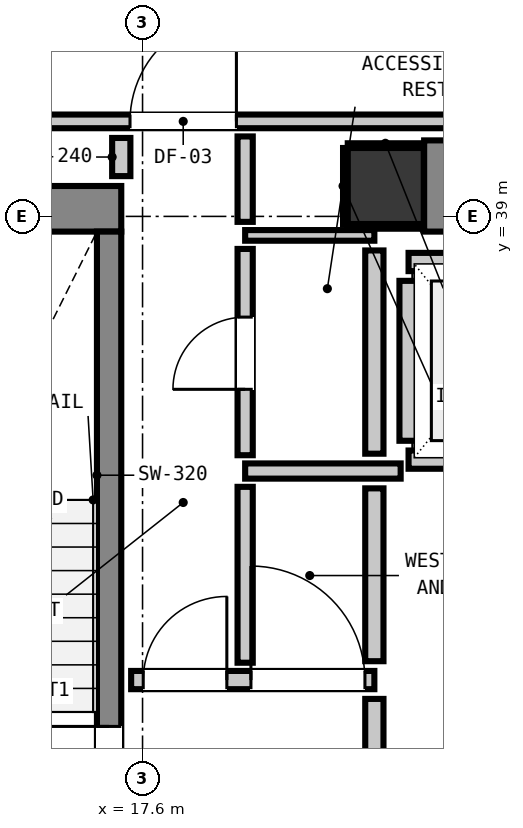
"""IFC4 building model, lengths in metres.
Left out: names, types, materials, properties, quantities, classifications, styles, units other than length and angle.
Written with IfcOpenShell. Run it as: python <this file> out.ifc"""

import sys

from ifc_helpers import new_model, si_unit, direction, frame, frame_2d, origin, origin_2d, place, context, subcontext, project, spatial, rectangle, extrude, element, fill, save


model = new_model("IFC4")
c1 = context("Model", 3, precision=1e-05, world=origin(), true_north=direction((0.0, 1.0)))
c2 = subcontext(c1, "Body", "Model", "MODEL_VIEW")
j1 = project(units=[si_unit("LENGTHUNIT", "METRE"), si_unit("PLANEANGLEUNIT", "RADIAN")], contexts=[c1])
p1 = place(None, origin())
s1 = spatial("IfcSite", under=j1, at=p1, CompositionType="ELEMENT")
p2 = place(p1, origin())
s2 = spatial("IfcBuilding", under=s1, at=p2, CompositionType="ELEMENT")
p3 = place(p2, frame((0.0, 0.0, 35.28)))
s3 = spatial("IfcBuildingStorey", under=s2, at=p3, CompositionType="ELEMENT", Elevation=35.28)
p4 = place(p3, frame((20.8, 39.4, 0.0), z_axis=(0.0, 0.0, 1.0), x_axis=(1.0, 0.0, 0.0)))
e1 = element("IfcColumn", 1, at=p4, inside=s3, PredefinedType="COLUMN", context=c2, shape_type="SweptSolid", body=[
    extrude(rectangle(XDim=1.0, YDim=1.0, at=origin_2d()), origin(), (0.0, 0.0, 1.0), 3.32),
])
p5 = place(p3, frame((13.24, 39.1, 0.0), z_axis=(0.0, 0.0, 1.0), x_axis=(1.0, 0.0, 0.0)))
e2 = element("IfcWall", 2, at=p5, inside=s3, PredefinedType="SHEAR", context=c2, shape_type="SweptSolid", body=[
    extrude(rectangle(XDim=4.08, YDim=0.6, at=frame_2d((2.04, 0.0))), origin(), (0.0, 0.0, 1.0), 3.32),
])
p6 = place(p3, frame((21.305, 39.4, 0.0), z_axis=(0.0, 0.0, 1.0), x_axis=(1.0, 0.0, 0.0)))
e3 = element("IfcWall", 3, at=p6, inside=s3, PredefinedType="SHEAR", context=c2, shape_type="SweptSolid", body=[
    extrude(rectangle(XDim=7.39, YDim=1.2, at=frame_2d((3.695, 0.0))), origin(), (0.0, 0.0, 1.0), 3.32),
])
p7 = place(p3, frame((17.16, 31.0, 0.0), z_axis=(0.0, 0.0, 1.0), x_axis=(0.0, 1.0, 0.0)))
e4 = element("IfcWall", 4, at=p7, inside=s3, PredefinedType="SHEAR", context=c2, shape_type="SweptSolid", body=[
    extrude(rectangle(XDim=7.8, YDim=0.32, at=frame_2d((3.9, 0.0))), origin(), (0.0, 0.0, 1.0), 3.32),
])
p8 = place(p7, frame((0.19, 0.0, 0.0)))
e5 = element("IfcOpeningElement", 5, at=p8, cuts=e4, PredefinedType="OPENING", context=c2, shape_type="SweptSolid", body=[
    extrude(rectangle(XDim=1.1, YDim=2.15, at=frame_2d((0.55, 1.075))), frame((0.0, 0.17, 0.0), z_axis=(0.0, -1.0, 0.0), x_axis=(1.0, 0.0, 0.0)), (0.0, 0.0, 1.0), 0.34),
])
for number, where, z_axis, x_axis in (
    (6, (21.1, 35.8, 0.0), (0.0, 0.0, 1.0), (1.0, 0.0, 0.0)),
    (7, (21.1, 38.4, 0.0), (0.0, 0.0, 1.0), (1.0, 0.0, 0.0)),
):
    element("IfcWall", number, at=place(p3, frame(where, z_axis=z_axis, x_axis=x_axis)), inside=s3, PredefinedType="PARTITIONING", context=c2, shape_type="SweptSolid", body=[
        extrude(rectangle(XDim=2.2, YDim=0.24, at=frame_2d((1.1, 0.0))), origin(), (0.0, 0.0, 1.0), 3.06),
    ])
p9 = place(p3, frame((21.1, 36.048, 0.0), z_axis=(0.0, 0.0, 1.0), x_axis=(0.0, 1.0, 0.0)))
e8 = element("IfcWall", 8, at=p9, inside=s3, PredefinedType="PARTITIONING", context=c2, shape_type="SweptSolid", body=[
    extrude(rectangle(XDim=2.104, YDim=0.24, at=frame_2d((1.052, 0.0))), origin(), (0.0, 0.0, 1.0), 2.295),
])
p10 = place(p3, frame((17.45, 32.9, 0.0), z_axis=(0.0, 0.0, 1.0), x_axis=(1.0, 0.0, 0.0)))
e9 = element("IfcWall", 9, at=p10, inside=s3, PredefinedType="PARTITIONING", context=c2, shape_type="SweptSolid", body=[
    extrude(rectangle(XDim=3.2, YDim=0.24, at=frame_2d((1.6, 0.0))), origin(), (0.0, 0.0, 1.0), 3.06),
])
p11 = place(p10, frame((0.159, 0.0, 0.0)))
e10 = element("IfcOpeningElement", 10, at=p11, cuts=e9, PredefinedType="OPENING", context=c2, shape_type="SweptSolid", body=[
    extrude(rectangle(XDim=1.1, YDim=2.15, at=frame_2d((0.55, 1.075))), frame((0.0, 0.13, 0.0), z_axis=(0.0, -1.0, 0.0), x_axis=(1.0, 0.0, 0.0)), (0.0, 0.0, 1.0), 0.26),
])
p12 = place(p10, frame((1.576, 0.0, 0.0)))
e11 = element("IfcOpeningElement", 11, at=p12, cuts=e9, PredefinedType="OPENING", context=c2, shape_type="SweptSolid", body=[
    extrude(rectangle(XDim=1.5, YDim=2.15, at=frame_2d((0.75, 1.075))), frame((0.0, 0.13, 0.0), z_axis=(0.0, -1.0, 0.0), x_axis=(1.0, 0.0, 0.0)), (0.0, 0.0, 1.0), 0.26),
])
p13 = place(p3, frame((18.95, 35.65, 0.0), z_axis=(0.0, 0.0, 1.0), x_axis=(1.0, 0.0, 0.0)))
e12 = element("IfcWall", 12, at=p13, inside=s3, PredefinedType="PARTITIONING", context=c2, shape_type="SweptSolid", body=[
    extrude(rectangle(XDim=2.046, YDim=0.2, at=frame_2d((1.023, 0.0))), origin(), (0.0, 0.0, 1.0), 3.06),
])
p14 = place(p3, frame((12.989, 40.25, 0.0), z_axis=(0.0, 0.0, 1.0), x_axis=(1.0, 0.0, 0.0)))
e13 = element("IfcWall", 13, at=p14, inside=s3, PredefinedType="PARTITIONING", context=c2, shape_type="SweptSolid", body=[
    extrude(rectangle(XDim=30.984, YDim=0.18, at=frame_2d((15.492, 0.0))), origin(), (0.0, 0.0, 1.0), 3.06),
])
p15 = place(p14, frame((4.446, 0.0, 0.0)))
e14 = element("IfcOpeningElement", 14, at=p15, cuts=e13, PredefinedType="OPENING", context=c2, shape_type="SweptSolid", body=[
    extrude(rectangle(XDim=1.4, YDim=2.15, at=frame_2d((0.7, 1.075))), frame((0.0, 0.1, 0.0), z_axis=(0.0, -1.0, 0.0), x_axis=(1.0, 0.0, 0.0)), (0.0, 0.0, 1.0), 0.2),
])
p16 = place(p14, frame((27.362, 0.0, 0.0)))
e15 = element("IfcOpeningElement", 15, at=p16, cuts=e13, PredefinedType="OPENING", context=c2, shape_type="SweptSolid", body=[
    extrude(rectangle(XDim=1.0, YDim=2.15, at=frame_2d((0.5, 1.075))), frame((0.0, 0.1, 0.0), z_axis=(0.0, -1.0, 0.0), x_axis=(1.0, 0.0, 0.0)), (0.0, 0.0, 1.0), 0.2),
])
p17 = place(p3, frame((18.95, 38.75, 0.0), z_axis=(0.0, 0.0, 1.0), x_axis=(1.0, 0.0, 0.0)))
e16 = element("IfcWall", 16, at=p17, inside=s3, PredefinedType="PARTITIONING", context=c2, shape_type="SweptSolid", body=[
    extrude(rectangle(XDim=1.7, YDim=0.14, at=frame_2d((0.85, 0.0))), origin(), (0.0, 0.0, 1.0), 3.06),
])
p18 = place(p3, frame((17.32, 39.53, 0.0), z_axis=(0.0, 0.0, 1.0), x_axis=(0.0, 1.0, 0.0)))
e17 = element("IfcWall", 17, at=p18, inside=s3, PredefinedType="PARTITIONING", context=c2, shape_type="SweptSolid", body=[
    extrude(rectangle(XDim=0.502, YDim=0.24, at=frame_2d((0.251, 0.0))), origin(), (0.0, 0.0, 1.0), 3.06),
])
p19 = place(p3, frame((20.65, 31.332, 0.0), z_axis=(0.0, 0.0, 1.0), x_axis=(0.0, 1.0, 0.0)))
e18 = element("IfcWall", 18, at=p19, inside=s3, PredefinedType="PARTITIONING", context=c2, shape_type="SweptSolid", body=[
    extrude(rectangle(XDim=1.32, YDim=0.24, at=frame_2d((0.66, 0.0))), origin(), (0.0, 0.0, 1.0), 2.295),
])
p20 = place(p3, frame((20.65, 33.148, 0.0), z_axis=(0.0, 0.0, 1.0), x_axis=(0.0, 1.0, 0.0)))
e19 = element("IfcWall", 19, at=p20, inside=s3, PredefinedType="PARTITIONING", context=c2, shape_type="SweptSolid", body=[
    extrude(rectangle(XDim=2.274, YDim=0.24, at=frame_2d((1.137, 0.0))), origin(), (0.0, 0.0, 1.0), 2.295),
])
p21 = place(p3, frame((20.65, 35.878, 0.0), z_axis=(0.0, 0.0, 1.0), x_axis=(0.0, 1.0, 0.0)))
e20 = element("IfcWall", 20, at=p21, inside=s3, PredefinedType="PARTITIONING", context=c2, shape_type="SweptSolid", body=[
    extrude(rectangle(XDim=2.674, YDim=0.24, at=frame_2d((1.337, 0.0))), origin(), (0.0, 0.0, 1.0), 2.295),
])
p22 = place(p3, frame((18.95, 33.128, 0.0), z_axis=(0.0, 0.0, 1.0), x_axis=(0.0, 1.0, 0.0)))
e21 = element("IfcWall", 21, at=p22, inside=s3, PredefinedType="PARTITIONING", context=c2, shape_type="SweptSolid", body=[
    extrude(rectangle(XDim=2.314, YDim=0.2, at=frame_2d((1.157, 0.0))), origin(), (0.0, 0.0, 1.0), 3.06),
])
p23 = place(p3, frame((18.95, 35.858, 0.0), z_axis=(0.0, 0.0, 1.0), x_axis=(0.0, 1.0, 0.0)))
e22 = element("IfcWall", 22, at=p23, inside=s3, PredefinedType="PARTITIONING", context=c2, shape_type="SweptSolid", body=[
    extrude(rectangle(XDim=2.714, YDim=0.2, at=frame_2d((1.357, 0.0))), origin(), (0.0, 0.0, 1.0), 3.06),
])
p24 = place(p23, frame((0.867, 0.0, 0.0)))
e23 = element("IfcOpeningElement", 23, at=p24, cuts=e22, PredefinedType="OPENING", context=c2, shape_type="SweptSolid", body=[
    extrude(rectangle(XDim=0.95, YDim=2.1, at=frame_2d((0.475, 1.05))), frame((0.0, 0.11, 0.0), z_axis=(0.0, -1.0, 0.0), x_axis=(1.0, 0.0, 0.0)), (0.0, 0.0, 1.0), 0.22),
])
p25 = place(p3, frame((18.95, 38.928, 0.0), z_axis=(0.0, 0.0, 1.0), x_axis=(0.0, 1.0, 0.0)))
e24 = element("IfcWall", 24, at=p25, inside=s3, PredefinedType="PARTITIONING", context=c2, shape_type="SweptSolid", body=[
    extrude(rectangle(XDim=1.124, YDim=0.2, at=frame_2d((0.562, 0.0))), origin(), (0.0, 0.0, 1.0), 3.06),
])
for number, where, z_axis, x_axis in (
    (25, (20.3, 38.868, 0.0), (0.0, 0.0, 1.0), (1.0, 0.0, 0.0)),
    (26, (20.3, 39.932, 0.0), (0.0, 0.0, 1.0), (1.0, 0.0, 0.0)),
):
    element("IfcWall", number, at=place(p3, frame(where, z_axis=z_axis, x_axis=x_axis)), inside=s3, PredefinedType="PARTITIONING", context=c2, shape_type="SweptSolid", body=[
        extrude(rectangle(XDim=0.99, YDim=0.06, at=frame_2d((0.495, 0.0))), origin(), (0.0, 0.0, 1.0), 1.45),
    ])
p26 = place(p3, frame((20.268, 38.9, 0.0), z_axis=(0.0, 0.0, 1.0), x_axis=(0.0, 1.0, 0.0)))
e27 = element("IfcWall", 27, at=p26, inside=s3, PredefinedType="PARTITIONING", context=c2, shape_type="SweptSolid", body=[
    extrude(rectangle(XDim=1.0, YDim=0.06, at=frame_2d((0.5, 0.0))), origin(), (0.0, 0.0, 1.0), 1.45),
])
p27 = place(p8, origin())
e28 = element("IfcDoor", 28, at=p27, inside=s3, OperationType="SINGLE_SWING_RIGHT", PredefinedType="DOOR", context=c2, shape_type="SweptSolid", body=[
    extrude(rectangle(XDim=1.1, YDim=2.15, at=frame_2d((0.55, 1.075))), frame((0.0, 0.025, 0.0), z_axis=(0.0, -1.0, 0.0), x_axis=(1.0, 0.0, 0.0)), (0.0, 0.0, 1.0), 0.05),
])
fill(e5, e28)
p28 = place(p11, origin())
e29 = element("IfcDoor", 29, at=p28, inside=s3, OperationType="SINGLE_SWING_RIGHT", PredefinedType="DOOR", context=c2, shape_type="SweptSolid", body=[
    extrude(rectangle(XDim=1.1, YDim=2.15, at=frame_2d((0.55, 1.075))), frame((0.0, 0.025, 0.0), z_axis=(0.0, -1.0, 0.0), x_axis=(1.0, 0.0, 0.0)), (0.0, 0.0, 1.0), 0.05),
])
fill(e10, e29)
p29 = place(p15, origin())
e30 = element("IfcDoor", 30, at=p29, inside=s3, OperationType="SINGLE_SWING_RIGHT", PredefinedType="DOOR", context=c2, shape_type="SweptSolid", body=[
    extrude(rectangle(XDim=1.4, YDim=2.15, at=frame_2d((0.7, 1.075))), frame((0.0, 0.025, 0.0), z_axis=(0.0, -1.0, 0.0), x_axis=(1.0, 0.0, 0.0)), (0.0, 0.0, 1.0), 0.05),
])
fill(e14, e30)
p30 = place(p12, origin())
e31 = element("IfcDoor", 31, at=p30, inside=s3, OperationType="SINGLE_SWING_LEFT", PredefinedType="DOOR", context=c2, shape_type="SweptSolid", body=[
    extrude(rectangle(XDim=1.5, YDim=2.15, at=frame_2d((0.75, 1.075))), frame((0.0, 0.025, 0.0), z_axis=(0.0, -1.0, 0.0), x_axis=(1.0, 0.0, 0.0)), (0.0, 0.0, 1.0), 0.05),
])
fill(e11, e31)
p31 = place(p24, origin())
e32 = element("IfcDoor", 32, at=p31, inside=s3, OperationType="SINGLE_SWING_LEFT", PredefinedType="DOOR", context=c2, shape_type="SweptSolid", body=[
    extrude(rectangle(XDim=0.95, YDim=2.1, at=frame_2d((0.475, 1.05))), frame((0.0, 0.025, 0.0), z_axis=(0.0, -1.0, 0.0), x_axis=(1.0, 0.0, 0.0)), (0.0, 0.0, 1.0), 0.05),
])
fill(e23, e32)
save(model, sys.argv[1])
